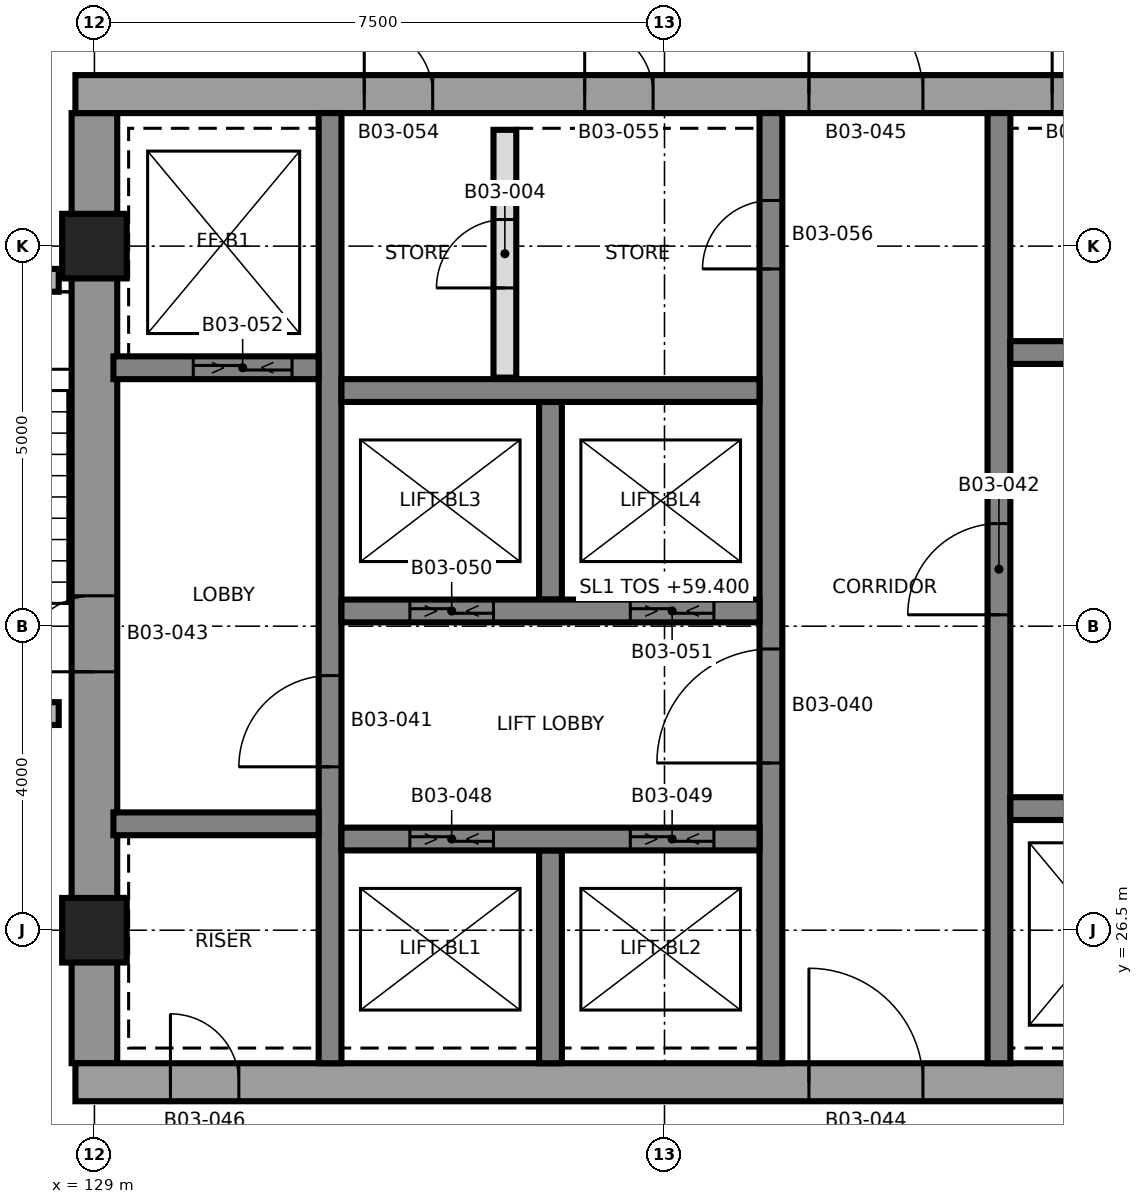
"""IFC4 building model, lengths in metres.
Left out: names, types, materials, properties, quantities, classifications, styles, units other than length and angle.
Written with IfcOpenShell. Run it as: python <this file> out.ifc"""

import sys

from ifc_helpers import new_model, si_unit, direction, frame, frame_2d, origin, origin_2d, place, context, subcontext, project, spatial, rectangle, extrude, element, fill, save


model = new_model("IFC4")
c1 = context("Model", 3, precision=1e-05, world=origin(), true_north=direction((0.0, 1.0)))
c2 = subcontext(c1, "Body", "Model", "MODEL_VIEW")
j1 = project(units=[si_unit("LENGTHUNIT", "METRE"), si_unit("PLANEANGLEUNIT", "RADIAN")], contexts=[c1])
p1 = place(None, origin())
s1 = spatial("IfcSite", under=j1, at=p1, CompositionType="ELEMENT")
p2 = place(p1, origin())
s2 = spatial("IfcBuilding", under=s1, at=p2, CompositionType="ELEMENT")
p3 = place(p2, frame((0.0, 0.0, 59.4)))
s3 = spatial("IfcBuildingStorey", under=s2, at=p3, CompositionType="ELEMENT", Elevation=59.4)
p4 = place(p3, frame((129.0, 24.75, 0.0), z_axis=(0.0, 0.0, 1.0), x_axis=(0.0, 1.0, 0.0)))
e1 = element("IfcWall", 1, at=p4, inside=s3, PredefinedType="SHEAR", context=c2, shape_type="SweptSolid", body=[
    extrude(rectangle(XDim=12.5, YDim=0.6, at=frame_2d((6.25, 0.0))), origin(), (0.0, 0.0, 1.0), 3.7),
])
p5 = place(p4, frame((5.15, 0.0, 0.0)))
e2 = element("IfcOpeningElement", 2, at=p5, cuts=e1, PredefinedType="OPENING", context=c2, shape_type="SweptSolid", body=[
    extrude(rectangle(XDim=1.0, YDim=2.1, at=frame_2d((0.5, 1.05))), frame((0.0, 0.31, 0.0), z_axis=(0.0, -1.0, 0.0), x_axis=(1.0, 0.0, 0.0)), (0.0, 0.0, 1.0), 0.62),
])
p6 = place(p3, frame((128.75, 24.5, 0.0), z_axis=(0.0, 0.0, 1.0), x_axis=(1.0, 0.0, 0.0)))
e3 = element("IfcWall", 3, at=p6, inside=s3, PredefinedType="SHEAR", context=c2, shape_type="SweptSolid", body=[
    extrude(rectangle(XDim=15.0, YDim=0.5, at=frame_2d((7.5, 0.0))), origin(), (0.0, 0.0, 1.0), 3.7),
])
p7 = place(p6, frame((9.65, 0.0, 0.0)))
e4 = element("IfcOpeningElement", 4, at=p7, cuts=e3, PredefinedType="OPENING", context=c2, shape_type="SweptSolid", body=[
    extrude(rectangle(XDim=1.5, YDim=2.1, at=frame_2d((0.75, 1.05))), frame((0.0, 0.26, 0.0), z_axis=(0.0, -1.0, 0.0), x_axis=(1.0, 0.0, 0.0)), (0.0, 0.0, 1.0), 0.52),
])
p8 = place(p6, frame((1.25, 0.0, 0.0)))
e5 = element("IfcOpeningElement", 5, at=p8, cuts=e3, PredefinedType="OPENING", context=c2, shape_type="SweptSolid", body=[
    extrude(rectangle(XDim=0.9, YDim=2.1, at=frame_2d((0.45, 1.05))), frame((0.0, 0.26, 0.0), z_axis=(0.0, -1.0, 0.0), x_axis=(1.0, 0.0, 0.0)), (0.0, 0.0, 1.0), 0.52),
])
p9 = place(p3, frame((128.75, 37.5, 0.0), z_axis=(0.0, 0.0, 1.0), x_axis=(1.0, 0.0, 0.0)))
e6 = element("IfcWall", 6, at=p9, inside=s3, PredefinedType="SHEAR", context=c2, shape_type="SweptSolid", body=[
    extrude(rectangle(XDim=15.0, YDim=0.5, at=frame_2d((7.5, 0.0))), origin(), (0.0, 0.0, 1.0), 3.7),
])
p10 = place(p9, frame((9.65, 0.0, 0.0)))
e7 = element("IfcOpeningElement", 7, at=p10, cuts=e6, PredefinedType="OPENING", context=c2, shape_type="SweptSolid", body=[
    extrude(rectangle(XDim=1.5, YDim=2.1, at=frame_2d((0.75, 1.05))), frame((0.0, 0.26, 0.0), z_axis=(0.0, -1.0, 0.0), x_axis=(1.0, 0.0, 0.0)), (0.0, 0.0, 1.0), 0.52),
])
p11 = place(p9, frame((12.85, 0.0, 0.0)))
e8 = element("IfcOpeningElement", 8, at=p11, cuts=e6, PredefinedType="OPENING", context=c2, shape_type="SweptSolid", body=[
    extrude(rectangle(XDim=0.9, YDim=2.1, at=frame_2d((0.45, 1.05))), frame((0.0, 0.26, 0.0), z_axis=(0.0, -1.0, 0.0), x_axis=(1.0, 0.0, 0.0)), (0.0, 0.0, 1.0), 0.52),
])
p12 = place(p9, frame((3.8, 0.0, 0.0)))
e9 = element("IfcOpeningElement", 9, at=p12, cuts=e6, PredefinedType="OPENING", context=c2, shape_type="SweptSolid", body=[
    extrude(rectangle(XDim=0.9, YDim=2.1, at=frame_2d((0.45, 1.05))), frame((0.0, 0.26, 0.0), z_axis=(0.0, -1.0, 0.0), x_axis=(1.0, 0.0, 0.0)), (0.0, 0.0, 1.0), 0.52),
])
p13 = place(p9, frame((6.7, 0.0, 0.0)))
e10 = element("IfcOpeningElement", 10, at=p13, cuts=e6, PredefinedType="OPENING", context=c2, shape_type="SweptSolid", body=[
    extrude(rectangle(XDim=0.9, YDim=2.1, at=frame_2d((0.45, 1.05))), frame((0.0, 0.26, 0.0), z_axis=(0.0, -1.0, 0.0), x_axis=(1.0, 0.0, 0.0)), (0.0, 0.0, 1.0), 0.52),
])
p14 = place(p3, frame((132.1, 24.75, 0.0), z_axis=(0.0, 0.0, 1.0), x_axis=(0.0, 1.0, 0.0)))
e11 = element("IfcWall", 11, at=p14, inside=s3, PredefinedType="SHEAR", context=c2, shape_type="SweptSolid", body=[
    extrude(rectangle(XDim=12.5, YDim=0.3, at=frame_2d((6.25, 0.0))), origin(), (0.0, 0.0, 1.0), 3.7),
])
p15 = place(p14, frame((3.9, 0.0, 0.0)))
e12 = element("IfcOpeningElement", 12, at=p15, cuts=e11, PredefinedType="OPENING", context=c2, shape_type="SweptSolid", body=[
    extrude(rectangle(XDim=1.2, YDim=2.1, at=frame_2d((0.6, 1.05))), frame((0.0, 0.16, 0.0), z_axis=(0.0, -1.0, 0.0), x_axis=(1.0, 0.0, 0.0)), (0.0, 0.0, 1.0), 0.32),
])
p16 = place(p3, frame((137.9, 24.75, 0.0), z_axis=(0.0, 0.0, 1.0), x_axis=(0.0, 1.0, 0.0)))
e13 = element("IfcWall", 13, at=p16, inside=s3, PredefinedType="SHEAR", context=c2, shape_type="SweptSolid", body=[
    extrude(rectangle(XDim=12.5, YDim=0.3, at=frame_2d((6.25, 0.0))), origin(), (0.0, 0.0, 1.0), 3.7),
])
p17 = place(p16, frame((3.95, 0.0, 0.0)))
e14 = element("IfcOpeningElement", 14, at=p17, cuts=e13, PredefinedType="OPENING", context=c2, shape_type="SweptSolid", body=[
    extrude(rectangle(XDim=1.5, YDim=2.1, at=frame_2d((0.75, 1.05))), frame((0.0, 0.16, 0.0), z_axis=(0.0, -1.0, 0.0), x_axis=(1.0, 0.0, 0.0)), (0.0, 0.0, 1.0), 0.32),
])
p18 = place(p16, frame((10.45, 0.0, 0.0)))
e15 = element("IfcOpeningElement", 15, at=p18, cuts=e13, PredefinedType="OPENING", context=c2, shape_type="SweptSolid", body=[
    extrude(rectangle(XDim=0.9, YDim=2.1, at=frame_2d((0.45, 1.05))), frame((0.0, 0.16, 0.0), z_axis=(0.0, -1.0, 0.0), x_axis=(1.0, 0.0, 0.0)), (0.0, 0.0, 1.0), 0.32),
])
p19 = place(p3, frame((140.9, 24.75, 0.0), z_axis=(0.0, 0.0, 1.0), x_axis=(0.0, 1.0, 0.0)))
e16 = element("IfcWall", 16, at=p19, inside=s3, PredefinedType="SHEAR", context=c2, shape_type="SweptSolid", body=[
    extrude(rectangle(XDim=12.5, YDim=0.3, at=frame_2d((6.25, 0.0))), origin(), (0.0, 0.0, 1.0), 3.7),
])
p20 = place(p19, frame((5.9, 0.0, 0.0)))
e17 = element("IfcOpeningElement", 17, at=p20, cuts=e16, PredefinedType="OPENING", context=c2, shape_type="SweptSolid", body=[
    extrude(rectangle(XDim=1.2, YDim=2.1, at=frame_2d((0.6, 1.05))), frame((0.0, 0.16, 0.0), z_axis=(0.0, -1.0, 0.0), x_axis=(1.0, 0.0, 0.0)), (0.0, 0.0, 1.0), 0.32),
])
p21 = place(p3, frame((135.0, 24.75, 0.0), z_axis=(0.0, 0.0, 1.0), x_axis=(0.0, 1.0, 0.0)))
e18 = element("IfcWall", 18, at=p21, inside=s3, PredefinedType="SHEAR", context=c2, shape_type="SweptSolid", body=[
    extrude(rectangle(XDim=2.8, YDim=0.3, at=frame_2d((1.4, 0.0))), origin(), (0.0, 0.0, 1.0), 3.7),
])
p22 = place(p3, frame((135.0, 30.85, 0.0), z_axis=(0.0, 0.0, 1.0), x_axis=(0.0, 1.0, 0.0)))
e19 = element("IfcWall", 19, at=p22, inside=s3, PredefinedType="SHEAR", context=c2, shape_type="SweptSolid", body=[
    extrude(rectangle(XDim=2.6, YDim=0.3, at=frame_2d((1.3, 0.0))), origin(), (0.0, 0.0, 1.0), 3.7),
])
p23 = place(p3, frame((132.25, 27.7, 0.0), z_axis=(0.0, 0.0, 1.0), x_axis=(1.0, 0.0, 0.0)))
e20 = element("IfcWall", 20, at=p23, inside=s3, PredefinedType="SHEAR", context=c2, shape_type="SweptSolid", body=[
    extrude(rectangle(XDim=5.5, YDim=0.3, at=frame_2d((2.75, 0.0))), origin(), (0.0, 0.0, 1.0), 3.7),
])
p24 = place(p23, frame((0.9, 0.0, 0.0)))
e21 = element("IfcOpeningElement", 21, at=p24, cuts=e20, PredefinedType="OPENING", context=c2, shape_type="SweptSolid", body=[
    extrude(rectangle(XDim=1.1, YDim=2.4, at=frame_2d((0.55, 1.2))), frame((0.0, 0.16, 0.0), z_axis=(0.0, -1.0, 0.0), x_axis=(1.0, 0.0, 0.0)), (0.0, 0.0, 1.0), 0.32),
])
p25 = place(p23, frame((3.8, 0.0, 0.0)))
e22 = element("IfcOpeningElement", 22, at=p25, cuts=e20, PredefinedType="OPENING", context=c2, shape_type="SweptSolid", body=[
    extrude(rectangle(XDim=1.1, YDim=2.4, at=frame_2d((0.55, 1.2))), frame((0.0, 0.16, 0.0), z_axis=(0.0, -1.0, 0.0), x_axis=(1.0, 0.0, 0.0)), (0.0, 0.0, 1.0), 0.32),
])
p26 = place(p3, frame((132.25, 30.7, 0.0), z_axis=(0.0, 0.0, 1.0), x_axis=(1.0, 0.0, 0.0)))
e23 = element("IfcWall", 23, at=p26, inside=s3, PredefinedType="SHEAR", context=c2, shape_type="SweptSolid", body=[
    extrude(rectangle(XDim=5.5, YDim=0.3, at=frame_2d((2.75, 0.0))), origin(), (0.0, 0.0, 1.0), 3.7),
])
p27 = place(p26, frame((0.9, 0.0, 0.0)))
e24 = element("IfcOpeningElement", 24, at=p27, cuts=e23, PredefinedType="OPENING", context=c2, shape_type="SweptSolid", body=[
    extrude(rectangle(XDim=1.1, YDim=2.4, at=frame_2d((0.55, 1.2))), frame((0.0, 0.16, 0.0), z_axis=(0.0, -1.0, 0.0), x_axis=(1.0, 0.0, 0.0)), (0.0, 0.0, 1.0), 0.32),
])
p28 = place(p26, frame((3.8, 0.0, 0.0)))
e25 = element("IfcOpeningElement", 25, at=p28, cuts=e23, PredefinedType="OPENING", context=c2, shape_type="SweptSolid", body=[
    extrude(rectangle(XDim=1.1, YDim=2.4, at=frame_2d((0.55, 1.2))), frame((0.0, 0.16, 0.0), z_axis=(0.0, -1.0, 0.0), x_axis=(1.0, 0.0, 0.0)), (0.0, 0.0, 1.0), 0.32),
])
p29 = place(p3, frame((132.25, 33.6, 0.0), z_axis=(0.0, 0.0, 1.0), x_axis=(1.0, 0.0, 0.0)))
e26 = element("IfcWall", 26, at=p29, inside=s3, PredefinedType="SHEAR", context=c2, shape_type="SweptSolid", body=[
    extrude(rectangle(XDim=5.5, YDim=0.3, at=frame_2d((2.75, 0.0))), origin(), (0.0, 0.0, 1.0), 3.7),
])
p30 = place(p3, frame((129.25, 27.9, 0.0), z_axis=(0.0, 0.0, 1.0), x_axis=(1.0, 0.0, 0.0)))
e27 = element("IfcWall", 27, at=p30, inside=s3, PredefinedType="SHEAR", context=c2, shape_type="SweptSolid", body=[
    extrude(rectangle(XDim=2.7, YDim=0.3, at=frame_2d((1.35, 0.0))), origin(), (0.0, 0.0, 1.0), 3.7),
])
p31 = place(p3, frame((129.25, 33.9, 0.0), z_axis=(0.0, 0.0, 1.0), x_axis=(1.0, 0.0, 0.0)))
e28 = element("IfcWall", 28, at=p31, inside=s3, PredefinedType="SHEAR", context=c2, shape_type="SweptSolid", body=[
    extrude(rectangle(XDim=2.7, YDim=0.3, at=frame_2d((1.35, 0.0))), origin(), (0.0, 0.0, 1.0), 3.7),
])
p32 = place(p31, frame((1.05, 0.0, 0.0)))
e29 = element("IfcOpeningElement", 29, at=p32, cuts=e28, PredefinedType="OPENING", context=c2, shape_type="SweptSolid", body=[
    extrude(rectangle(XDim=1.3, YDim=2.4, at=frame_2d((0.65, 1.2))), frame((0.0, 0.16, 0.0), z_axis=(0.0, -1.0, 0.0), x_axis=(1.0, 0.0, 0.0)), (0.0, 0.0, 1.0), 0.32),
])
p33 = place(p3, frame((141.05, 28.1, 0.0), z_axis=(0.0, 0.0, 1.0), x_axis=(1.0, 0.0, 0.0)))
e30 = element("IfcWall", 30, at=p33, inside=s3, PredefinedType="SHEAR", context=c2, shape_type="SweptSolid", body=[
    extrude(rectangle(XDim=2.7, YDim=0.3, at=frame_2d((1.35, 0.0))), origin(), (0.0, 0.0, 1.0), 3.7),
])
p34 = place(p33, frame((0.75, 0.0, 0.0)))
e31 = element("IfcOpeningElement", 31, at=p34, cuts=e30, PredefinedType="OPENING", context=c2, shape_type="SweptSolid", body=[
    extrude(rectangle(XDim=1.3, YDim=2.4, at=frame_2d((0.65, 1.2))), frame((0.0, 0.16, 0.0), z_axis=(0.0, -1.0, 0.0), x_axis=(1.0, 0.0, 0.0)), (0.0, 0.0, 1.0), 0.32),
])
p35 = place(p3, frame((141.05, 34.1, 0.0), z_axis=(0.0, 0.0, 1.0), x_axis=(1.0, 0.0, 0.0)))
e32 = element("IfcWall", 32, at=p35, inside=s3, PredefinedType="SHEAR", context=c2, shape_type="SweptSolid", body=[
    extrude(rectangle(XDim=2.7, YDim=0.3, at=frame_2d((1.35, 0.0))), origin(), (0.0, 0.0, 1.0), 3.7),
])
for number, where, z_axis, x_axis in (
    (33, (129.0, 26.5, 0.0), (0.0, 0.0, 1.0), (1.0, 0.0, 0.0)),
    (34, (129.0, 35.5, 0.0), (0.0, 0.0, 1.0), (1.0, 0.0, 0.0)),
):
    element("IfcColumn", number, at=place(p3, frame(where, z_axis=z_axis, x_axis=x_axis)), inside=s3, PredefinedType="COLUMN", context=c2, shape_type="SweptSolid", body=[
        extrude(rectangle(XDim=0.85, YDim=0.85, at=origin_2d()), origin(), (0.0, 0.0, 1.0), 3.7),
    ])
p36 = place(p3, frame((125.7, 29.35, 0.0), z_axis=(0.0, 0.0, 1.0), x_axis=(1.0, 0.0, 0.0)))
e35 = element("IfcWall", 35, at=p36, inside=s3, PredefinedType="SHEAR", context=c2, shape_type="SweptSolid", body=[
    extrude(rectangle(XDim=2.83, YDim=0.3, at=frame_2d((1.415, 0.0))), origin(), (0.0, 0.0, 1.0), 3.4),
])
p37 = place(p36, frame((0.975, 0.0, 0.0)))
e36 = element("IfcOpeningElement", 36, at=p37, cuts=e35, PredefinedType="OPENING", context=c2, shape_type="SweptSolid", body=[
    extrude(rectangle(XDim=1.2, YDim=2.1, at=frame_2d((0.6, 1.05))), frame((0.0, 0.16, 0.0), z_axis=(0.0, -1.0, 0.0), x_axis=(1.0, 0.0, 0.0)), (0.0, 0.0, 1.0), 0.32),
])
p38 = place(p3, frame((125.7, 35.05, 0.0), z_axis=(0.0, 0.0, 1.0), x_axis=(1.0, 0.0, 0.0)))
e37 = element("IfcWall", 37, at=p38, inside=s3, PredefinedType="SHEAR", context=c2, shape_type="SweptSolid", body=[
    extrude(rectangle(XDim=2.83, YDim=0.3, at=frame_2d((1.415, 0.0))), origin(), (0.0, 0.0, 1.0), 3.4),
])
p39 = place(p3, frame((134.4, 33.77, 0.0), z_axis=(0.0, 0.0, 1.0), x_axis=(0.0, 1.0, 0.0)))
e38 = element("IfcWall", 38, at=p39, inside=s3, PredefinedType="PARTITIONING", context=c2, shape_type="SweptSolid", body=[
    extrude(rectangle(XDim=3.26, YDim=0.3, at=frame_2d((1.63, 0.0))), origin(), (0.0, 0.0, 1.0), 3.4),
])
p40 = place(p39, frame((1.18, 0.0, 0.0)))
e39 = element("IfcOpeningElement", 39, at=p40, cuts=e38, PredefinedType="OPENING", context=c2, shape_type="SweptSolid", body=[
    extrude(rectangle(XDim=0.9, YDim=2.1, at=frame_2d((0.45, 1.05))), frame((0.0, 0.16, 0.0), z_axis=(0.0, -1.0, 0.0), x_axis=(1.0, 0.0, 0.0)), (0.0, 0.0, 1.0), 0.32),
])
p41 = place(p40, origin())
e40 = element("IfcDoor", 40, at=p41, inside=s3, OperationType="SINGLE_SWING_RIGHT", PredefinedType="DOOR", context=c2, shape_type="SweptSolid", body=[
    extrude(rectangle(XDim=0.9, YDim=2.1, at=frame_2d((0.45, 1.05))), frame((0.0, 0.025, 0.0), z_axis=(0.0, -1.0, 0.0), x_axis=(1.0, 0.0, 0.0)), (0.0, 0.0, 1.0), 0.05),
])
fill(e39, e40)
p42 = place(p17, origin())
e41 = element("IfcDoor", 41, at=p42, inside=s3, OperationType="SINGLE_SWING_RIGHT", PredefinedType="DOOR", context=c2, shape_type="SweptSolid", body=[
    extrude(rectangle(XDim=1.5, YDim=2.1, at=frame_2d((0.75, 1.05))), frame((0.0, 0.025, 0.0), z_axis=(0.0, -1.0, 0.0), x_axis=(1.0, 0.0, 0.0)), (0.0, 0.0, 1.0), 0.05),
])
fill(e14, e41)
p43 = place(p15, origin())
e42 = element("IfcDoor", 42, at=p43, inside=s3, OperationType="SINGLE_SWING_LEFT", PredefinedType="DOOR", context=c2, shape_type="SweptSolid", body=[
    extrude(rectangle(XDim=1.2, YDim=2.1, at=frame_2d((0.6, 1.05))), frame((0.0, 0.025, 0.0), z_axis=(0.0, -1.0, 0.0), x_axis=(1.0, 0.0, 0.0)), (0.0, 0.0, 1.0), 0.05),
])
fill(e12, e42)
p44 = place(p20, origin())
e43 = element("IfcDoor", 43, at=p44, inside=s3, OperationType="SINGLE_SWING_RIGHT", PredefinedType="DOOR", context=c2, shape_type="SweptSolid", body=[
    extrude(rectangle(XDim=1.2, YDim=2.1, at=frame_2d((0.6, 1.05))), frame((0.0, 0.025, 0.0), z_axis=(0.0, -1.0, 0.0), x_axis=(1.0, 0.0, 0.0)), (0.0, 0.0, 1.0), 0.05),
])
fill(e17, e43)
p45 = place(p5, origin())
e44 = element("IfcDoor", 44, at=p45, inside=s3, OperationType="SINGLE_SWING_RIGHT", PredefinedType="DOOR", context=c2, shape_type="SweptSolid", body=[
    extrude(rectangle(XDim=1.0, YDim=2.1, at=frame_2d((0.5, 1.05))), frame((0.0, 0.025, 0.0), z_axis=(0.0, -1.0, 0.0), x_axis=(1.0, 0.0, 0.0)), (0.0, 0.0, 1.0), 0.05),
])
fill(e2, e44)
p46 = place(p7, origin())
e45 = element("IfcDoor", 45, at=p46, inside=s3, OperationType="SINGLE_SWING_LEFT", PredefinedType="DOOR", context=c2, shape_type="SweptSolid", body=[
    extrude(rectangle(XDim=1.5, YDim=2.1, at=frame_2d((0.75, 1.05))), frame((0.0, 0.025, 0.0), z_axis=(0.0, -1.0, 0.0), x_axis=(1.0, 0.0, 0.0)), (0.0, 0.0, 1.0), 0.05),
])
fill(e4, e45)
p47 = place(p10, origin())
e46 = element("IfcDoor", 46, at=p47, inside=s3, OperationType="SINGLE_SWING_RIGHT", PredefinedType="DOOR", context=c2, shape_type="SweptSolid", body=[
    extrude(rectangle(XDim=1.5, YDim=2.1, at=frame_2d((0.75, 1.05))), frame((0.0, 0.025, 0.0), z_axis=(0.0, -1.0, 0.0), x_axis=(1.0, 0.0, 0.0)), (0.0, 0.0, 1.0), 0.05),
])
fill(e7, e46)
p48 = place(p8, origin())
e47 = element("IfcDoor", 47, at=p48, inside=s3, OperationType="SINGLE_SWING_LEFT", PredefinedType="DOOR", context=c2, shape_type="SweptSolid", body=[
    extrude(rectangle(XDim=0.9, YDim=2.1, at=frame_2d((0.45, 1.05))), frame((0.0, 0.025, 0.0), z_axis=(0.0, -1.0, 0.0), x_axis=(1.0, 0.0, 0.0)), (0.0, 0.0, 1.0), 0.05),
])
fill(e5, e47)
p49 = place(p11, origin())
e48 = element("IfcDoor", 48, at=p49, inside=s3, OperationType="SINGLE_SWING_RIGHT", PredefinedType="DOOR", context=c2, shape_type="SweptSolid", body=[
    extrude(rectangle(XDim=0.9, YDim=2.1, at=frame_2d((0.45, 1.05))), frame((0.0, 0.025, 0.0), z_axis=(0.0, -1.0, 0.0), x_axis=(1.0, 0.0, 0.0)), (0.0, 0.0, 1.0), 0.05),
])
fill(e8, e48)
p50 = place(p24, origin())
e49 = element("IfcDoor", 49, at=p50, inside=s3, OperationType="SLIDING_TO_LEFT", PredefinedType="DOOR", context=c2, shape_type="SweptSolid", body=[
    extrude(rectangle(XDim=1.1, YDim=2.4, at=frame_2d((0.55, 1.2))), frame((0.0, 0.025, 0.0), z_axis=(0.0, -1.0, 0.0), x_axis=(1.0, 0.0, 0.0)), (0.0, 0.0, 1.0), 0.05),
])
fill(e21, e49)
p51 = place(p25, origin())
e50 = element("IfcDoor", 50, at=p51, inside=s3, OperationType="SLIDING_TO_LEFT", PredefinedType="DOOR", context=c2, shape_type="SweptSolid", body=[
    extrude(rectangle(XDim=1.1, YDim=2.4, at=frame_2d((0.55, 1.2))), frame((0.0, 0.025, 0.0), z_axis=(0.0, -1.0, 0.0), x_axis=(1.0, 0.0, 0.0)), (0.0, 0.0, 1.0), 0.05),
])
fill(e22, e50)
p52 = place(p27, origin())
e51 = element("IfcDoor", 51, at=p52, inside=s3, OperationType="SLIDING_TO_LEFT", PredefinedType="DOOR", context=c2, shape_type="SweptSolid", body=[
    extrude(rectangle(XDim=1.1, YDim=2.4, at=frame_2d((0.55, 1.2))), frame((0.0, 0.025, 0.0), z_axis=(0.0, -1.0, 0.0), x_axis=(1.0, 0.0, 0.0)), (0.0, 0.0, 1.0), 0.05),
])
fill(e24, e51)
p53 = place(p28, origin())
e52 = element("IfcDoor", 52, at=p53, inside=s3, OperationType="SLIDING_TO_LEFT", PredefinedType="DOOR", context=c2, shape_type="SweptSolid", body=[
    extrude(rectangle(XDim=1.1, YDim=2.4, at=frame_2d((0.55, 1.2))), frame((0.0, 0.025, 0.0), z_axis=(0.0, -1.0, 0.0), x_axis=(1.0, 0.0, 0.0)), (0.0, 0.0, 1.0), 0.05),
])
fill(e25, e52)
p54 = place(p32, origin())
e53 = element("IfcDoor", 53, at=p54, inside=s3, OperationType="SLIDING_TO_LEFT", PredefinedType="DOOR", context=c2, shape_type="SweptSolid", body=[
    extrude(rectangle(XDim=1.3, YDim=2.4, at=frame_2d((0.65, 1.2))), frame((0.0, 0.025, 0.0), z_axis=(0.0, -1.0, 0.0), x_axis=(1.0, 0.0, 0.0)), (0.0, 0.0, 1.0), 0.05),
])
fill(e29, e53)
p55 = place(p12, origin())
e54 = element("IfcDoor", 54, at=p55, inside=s3, OperationType="SINGLE_SWING_LEFT", PredefinedType="DOOR", context=c2, shape_type="SweptSolid", body=[
    extrude(rectangle(XDim=0.9, YDim=2.1, at=frame_2d((0.45, 1.05))), frame((0.0, 0.025, 0.0), z_axis=(0.0, -1.0, 0.0), x_axis=(1.0, 0.0, 0.0)), (0.0, 0.0, 1.0), 0.05),
])
fill(e9, e54)
p56 = place(p13, origin())
e55 = element("IfcDoor", 55, at=p56, inside=s3, OperationType="SINGLE_SWING_RIGHT", PredefinedType="DOOR", context=c2, shape_type="SweptSolid", body=[
    extrude(rectangle(XDim=0.9, YDim=2.1, at=frame_2d((0.45, 1.05))), frame((0.0, 0.025, 0.0), z_axis=(0.0, -1.0, 0.0), x_axis=(1.0, 0.0, 0.0)), (0.0, 0.0, 1.0), 0.05),
])
fill(e10, e55)
p57 = place(p18, origin())
e56 = element("IfcDoor", 56, at=p57, inside=s3, OperationType="SINGLE_SWING_RIGHT", PredefinedType="DOOR", context=c2, shape_type="SweptSolid", body=[
    extrude(rectangle(XDim=0.9, YDim=2.1, at=frame_2d((0.45, 1.05))), frame((0.0, 0.025, 0.0), z_axis=(0.0, -1.0, 0.0), x_axis=(1.0, 0.0, 0.0)), (0.0, 0.0, 1.0), 0.05),
])
fill(e15, e56)
save(model, sys.argv[1])
